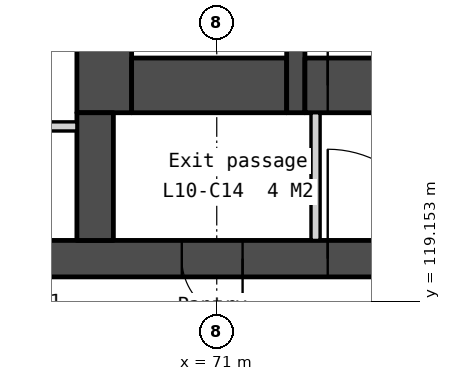
"""IFC4 building model, lengths in metres.
Left out: names, types, materials, properties, quantities, classifications, styles, units other than length and angle.
Written with IfcOpenShell. Run it as: python <this file> out.ifc"""

import sys

from ifc_helpers import new_model, si_unit, direction, frame, frame_2d, origin, place, context, subcontext, project, spatial, polyline, rectangle, outline, extrude, element, fill, save


model = new_model("IFC4")
c1 = context("Model", 3, precision=1e-05, world=origin(), true_north=direction((0.0, 1.0)))
c2 = subcontext(c1, "Body", "Model", "MODEL_VIEW")
j1 = project(units=[si_unit("LENGTHUNIT", "METRE"), si_unit("PLANEANGLEUNIT", "RADIAN")], contexts=[c1])
p1 = place(None, origin())
s1 = spatial("IfcSite", under=j1, at=p1, CompositionType="ELEMENT")
p2 = place(p1, origin())
s2 = spatial("IfcBuilding", under=s1, at=p2, CompositionType="ELEMENT")
p3 = place(p2, frame((0.0, 0.0, 49.0)))
s3 = spatial("IfcBuildingStorey", under=s2, at=p3, CompositionType="ELEMENT", Elevation=49.0)
p4 = place(p3, frame((66.0, 119.85, 0.0), z_axis=(0.0, 0.0, 1.0), x_axis=(1.0, 0.0, 0.0)))
e1 = element("IfcWall", 1, at=p4, inside=s3, PredefinedType="SOLIDWALL", context=c2, shape_type="SweptSolid", body=[
    extrude(rectangle(XDim=28.0, YDim=0.6, at=frame_2d((14.0, 0.0))), origin(), (0.0, 0.0, 1.0), 3.35),
])
p5 = place(p4, frame((6.825, 0.0, 0.0)))
e2 = element("IfcOpeningElement", 2, at=p5, cuts=e1, PredefinedType="OPENING", context=c2, shape_type="SweptSolid", body=[
    extrude(rectangle(XDim=1.8, YDim=2.1, at=frame_2d((0.9, 1.05))), frame((0.0, 0.31, 0.0), z_axis=(0.0, -1.0, 0.0), x_axis=(1.0, 0.0, 0.0)), (0.0, 0.0, 1.0), 0.62),
])
p6 = place(p4, frame((15.85, 0.0, 0.0)))
e3 = element("IfcOpeningElement", 3, at=p6, cuts=e1, PredefinedType="OPENING", context=c2, shape_type="SweptSolid", body=[
    extrude(rectangle(XDim=1.5, YDim=2.1, at=frame_2d((0.75, 1.05))), frame((0.0, 0.31, 0.0), z_axis=(0.0, -1.0, 0.0), x_axis=(1.0, 0.0, 0.0)), (0.0, 0.0, 1.0), 0.62),
])
p7 = place(p4, frame((19.375, 0.0, 0.0)))
e4 = element("IfcOpeningElement", 4, at=p7, cuts=e1, PredefinedType="OPENING", context=c2, shape_type="SweptSolid", body=[
    extrude(rectangle(XDim=1.8, YDim=2.1, at=frame_2d((0.9, 1.05))), frame((0.0, 0.31, 0.0), z_axis=(0.0, -1.0, 0.0), x_axis=(1.0, 0.0, 0.0)), (0.0, 0.0, 1.0), 0.62),
])
p8 = place(p4, frame((4.425, 0.0, 0.0)))
e5 = element("IfcOpeningElement", 5, at=p8, cuts=e1, PredefinedType="OPENING", context=c2, shape_type="SweptSolid", body=[
    extrude(rectangle(XDim=1.0, YDim=2.1, at=frame_2d((0.5, 1.05))), frame((0.0, 0.31, 0.0), z_axis=(0.0, -1.0, 0.0), x_axis=(1.0, 0.0, 0.0)), (0.0, 0.0, 1.0), 0.62),
])
p9 = place(p4, frame((9.783, 0.0, 0.0)))
e6 = element("IfcOpeningElement", 6, at=p9, cuts=e1, PredefinedType="OPENING", context=c2, shape_type="SweptSolid", body=[
    extrude(rectangle(XDim=1.0, YDim=2.1, at=frame_2d((0.5, 1.05))), frame((0.0, 0.31, 0.0), z_axis=(0.0, -1.0, 0.0), x_axis=(1.0, 0.0, 0.0)), (0.0, 0.0, 1.0), 0.62),
])
p10 = place(p4, frame((11.525, 0.0, 0.0)))
e7 = element("IfcOpeningElement", 7, at=p10, cuts=e1, PredefinedType="OPENING", context=c2, shape_type="SweptSolid", body=[
    extrude(rectangle(XDim=1.0, YDim=2.1, at=frame_2d((0.5, 1.05))), frame((0.0, 0.31, 0.0), z_axis=(0.0, -1.0, 0.0), x_axis=(1.0, 0.0, 0.0)), (0.0, 0.0, 1.0), 0.62),
])
p11 = place(p4, frame((13.658, 0.0, 0.0)))
e8 = element("IfcOpeningElement", 8, at=p11, cuts=e1, PredefinedType="OPENING", context=c2, shape_type="SweptSolid", body=[
    extrude(rectangle(XDim=1.0, YDim=2.1, at=frame_2d((0.5, 1.05))), frame((0.0, 0.31, 0.0), z_axis=(0.0, -1.0, 0.0), x_axis=(1.0, 0.0, 0.0)), (0.0, 0.0, 1.0), 0.62),
])
p12 = place(p4, frame((21.725, 0.0, 0.0)))
e9 = element("IfcOpeningElement", 9, at=p12, cuts=e1, PredefinedType="OPENING", context=c2, shape_type="SweptSolid", body=[
    extrude(rectangle(XDim=1.0, YDim=2.1, at=frame_2d((0.5, 1.05))), frame((0.0, 0.31, 0.0), z_axis=(0.0, -1.0, 0.0), x_axis=(1.0, 0.0, 0.0)), (0.0, 0.0, 1.0), 0.62),
])
p13 = place(p4, frame((23.425, 0.0, 0.0)))
e10 = element("IfcOpeningElement", 10, at=p13, cuts=e1, PredefinedType="OPENING", context=c2, shape_type="SweptSolid", body=[
    extrude(rectangle(XDim=1.0, YDim=2.1, at=frame_2d((0.5, 1.05))), frame((0.0, 0.31, 0.0), z_axis=(0.0, -1.0, 0.0), x_axis=(1.0, 0.0, 0.0)), (0.0, 0.0, 1.0), 0.62),
])
p14 = place(p3, frame((66.6, 122.025, 0.0), z_axis=(0.0, 0.0, 1.0), x_axis=(1.0, 0.0, 0.0)))
e11 = element("IfcWall", 11, at=p14, inside=s3, PredefinedType="PARTITIONING", context=c2, shape_type="SweptSolid", body=[
    extrude(rectangle(XDim=2.1, YDim=0.15, at=frame_2d((1.05, 0.0))), origin(), (0.0, 0.0, 1.0), 3.35),
])
p15 = place(p3, frame((69.15, 133.95, 0.0), z_axis=(0.0, 0.0, 1.0), x_axis=(0.0, -1.0, 0.0)))
e12 = element("IfcWall", 12, at=p15, inside=s3, PredefinedType="SOLIDWALL", context=c2, shape_type="SweptSolid", body=[
    extrude(rectangle(XDim=11.7, YDim=0.9, at=frame_2d((5.85, 0.0))), origin(), (0.0, 0.0, 1.0), 3.35),
])
p16 = place(p3, frame((69.0, 122.25, 0.0), z_axis=(0.0, 0.0, 1.0), x_axis=(0.0, -1.0, 0.0)))
e13 = element("IfcWall", 13, at=p16, inside=s3, PredefinedType="SOLIDWALL", context=c2, shape_type="SweptSolid", body=[
    extrude(rectangle(XDim=2.1, YDim=0.6, at=frame_2d((1.05, 0.0))), origin(), (0.0, 0.0, 1.0), 3.35),
])
p17 = place(p3, frame((69.6, 122.7, 0.0), z_axis=(0.0, 0.0, 1.0), x_axis=(1.0, 0.0, 0.0)))
e14 = element("IfcWall", 14, at=p17, inside=s3, PredefinedType="SOLIDWALL", context=c2, shape_type="SweptSolid", body=[
    extrude(rectangle(XDim=2.55, YDim=0.9, at=frame_2d((1.275, 0.0))), origin(), (0.0, 0.0, 1.0), 3.35),
])
p18 = place(p3, frame((72.3, 133.95, 0.0), z_axis=(0.0, 0.0, 1.0), x_axis=(0.0, -1.0, 0.0)))
e15 = element("IfcWall", 15, at=p18, inside=s3, PredefinedType="SOLIDWALL", context=c2, shape_type="SweptSolid", body=[
    extrude(rectangle(XDim=11.7, YDim=0.3, at=frame_2d((5.85, 0.0))), origin(), (0.0, 0.0, 1.0), 3.35),
])
p19 = place(p18, frame((6.95, 0.0, 0.0)))
e16 = element("IfcOpeningElement", 16, at=p19, cuts=e15, PredefinedType="OPENING", context=c2, shape_type="SweptSolid", body=[
    extrude(rectangle(XDim=1.1, YDim=2.1, at=frame_2d((0.55, 1.05))), frame((0.0, 0.16, 0.0), z_axis=(0.0, -1.0, 0.0), x_axis=(1.0, 0.0, 0.0)), (0.0, 0.0, 1.0), 0.32),
])
p20 = place(p18, frame((9.35, 0.0, 0.0)))
e17 = element("IfcOpeningElement", 17, at=p20, cuts=e15, PredefinedType="OPENING", context=c2, shape_type="SweptSolid", body=[
    extrude(rectangle(XDim=0.9, YDim=2.1, at=frame_2d((0.45, 1.05))), frame((0.0, 0.16, 0.0), z_axis=(0.0, -1.0, 0.0), x_axis=(1.0, 0.0, 0.0)), (0.0, 0.0, 1.0), 0.32),
])
p21 = place(p18, frame((5.1, 0.0, 0.0)))
e18 = element("IfcOpeningElement", 18, at=p21, cuts=e15, PredefinedType="OPENING", context=c2, shape_type="SweptSolid", body=[
    extrude(rectangle(XDim=1.0, YDim=2.1, at=frame_2d((0.5, 1.05))), frame((0.0, 0.16, 0.0), z_axis=(0.0, -1.0, 0.0), x_axis=(1.0, 0.0, 0.0)), (0.0, 0.0, 1.0), 0.32),
])
p22 = place(p3, frame((72.45, 122.7, 0.0), z_axis=(0.0, 0.0, 1.0), x_axis=(1.0, 0.0, 0.0)))
e19 = element("IfcWall", 19, at=p22, inside=s3, PredefinedType="SOLIDWALL", context=c2, shape_type="SweptSolid", body=[
    extrude(rectangle(XDim=2.55, YDim=0.9, at=frame_2d((1.275, 0.0))), origin(), (0.0, 0.0, 1.0), 3.35),
])
p23 = place(p22, frame((0.375, 0.0, 0.0)))
e20 = element("IfcOpeningElement", 20, at=p23, cuts=e19, PredefinedType="OPENING", context=c2, shape_type="SweptSolid", body=[
    extrude(rectangle(XDim=1.8, YDim=2.1, at=frame_2d((0.9, 1.05))), frame((0.0, 0.46, 0.0), z_axis=(0.0, -1.0, 0.0), x_axis=(1.0, 0.0, 0.0)), (0.0, 0.0, 1.0), 0.92),
])
p24 = place(p3, frame((72.625, 122.25, 0.0), z_axis=(0.0, 0.0, 1.0), x_axis=(0.0, -1.0, 0.0)))
e21 = element("IfcWall", 21, at=p24, inside=s3, PredefinedType="PARTITIONING", context=c2, shape_type="SweptSolid", body=[
    extrude(rectangle(XDim=2.1, YDim=0.15, at=frame_2d((1.05, 0.0))), origin(), (0.0, 0.0, 1.0), 3.35),
])
p25 = place(p3, frame((54.495, 129.397, -0.15), z_axis=(0.0, 0.0, 1.0), x_axis=(0.499999201451, -0.866025864826, 0.0)))
e22 = element("IfcWall", 22, at=p25, inside=s3, PredefinedType="SOLIDWALL", context=c2, shape_type="SweptSolid", body=[
    extrude(outline(polyline([(44.8, 0.0), (44.8, 3.5), (0.0, 3.5), (0.0, 0.0), (44.8, 0.0)])), frame((0.0, 0.225, 0.0), z_axis=(0.0, -1.0, 0.0), x_axis=(1.0, 0.0, 0.0)), (0.0, 0.0, 1.0), 0.45),
])
p26 = place(p25, frame((2.43, 0.0, 1.05)))
e23 = element("IfcOpeningElement", 23, at=p26, cuts=e22, PredefinedType="OPENING", context=c2, shape_type="SweptSolid", body=[
    extrude(rectangle(XDim=1.8, YDim=1.5, at=frame_2d((0.9, 0.75))), frame((0.0, 0.235, 0.0), z_axis=(0.0, -1.0, 0.0), x_axis=(1.0, 0.0, 0.0)), (0.0, 0.0, 1.0), 0.47),
])
p27 = place(p25, frame((4.73, 0.0, 1.05)))
e24 = element("IfcOpeningElement", 24, at=p27, cuts=e22, PredefinedType="OPENING", context=c2, shape_type="SweptSolid", body=[
    extrude(rectangle(XDim=1.8, YDim=1.5, at=frame_2d((0.9, 0.75))), frame((0.0, 0.235, 0.0), z_axis=(0.0, -1.0, 0.0), x_axis=(1.0, 0.0, 0.0)), (0.0, 0.0, 1.0), 0.47),
])
p28 = place(p25, frame((11.39, 0.0, 1.05)))
e25 = element("IfcOpeningElement", 25, at=p28, cuts=e22, PredefinedType="OPENING", context=c2, shape_type="SweptSolid", body=[
    extrude(rectangle(XDim=1.8, YDim=1.5, at=frame_2d((0.9, 0.75))), frame((0.0, 0.235, 0.0), z_axis=(0.0, -1.0, 0.0), x_axis=(1.0, 0.0, 0.0)), (0.0, 0.0, 1.0), 0.47),
])
p29 = place(p25, frame((13.69, 0.0, 1.05)))
e26 = element("IfcOpeningElement", 26, at=p29, cuts=e22, PredefinedType="OPENING", context=c2, shape_type="SweptSolid", body=[
    extrude(rectangle(XDim=1.8, YDim=1.5, at=frame_2d((0.9, 0.75))), frame((0.0, 0.235, 0.0), z_axis=(0.0, -1.0, 0.0), x_axis=(1.0, 0.0, 0.0)), (0.0, 0.0, 1.0), 0.47),
])
p30 = place(p25, frame((20.35, 0.0, 1.05)))
e27 = element("IfcOpeningElement", 27, at=p30, cuts=e22, PredefinedType="OPENING", context=c2, shape_type="SweptSolid", body=[
    extrude(rectangle(XDim=1.8, YDim=1.5, at=frame_2d((0.9, 0.75))), frame((0.0, 0.235, 0.0), z_axis=(0.0, -1.0, 0.0), x_axis=(1.0, 0.0, 0.0)), (0.0, 0.0, 1.0), 0.47),
])
p31 = place(p25, frame((22.65, 0.0, 1.05)))
e28 = element("IfcOpeningElement", 28, at=p31, cuts=e22, PredefinedType="OPENING", context=c2, shape_type="SweptSolid", body=[
    extrude(rectangle(XDim=1.8, YDim=1.5, at=frame_2d((0.9, 0.75))), frame((0.0, 0.235, 0.0), z_axis=(0.0, -1.0, 0.0), x_axis=(1.0, 0.0, 0.0)), (0.0, 0.0, 1.0), 0.47),
])
p32 = place(p25, frame((29.31, 0.0, 1.05)))
e29 = element("IfcOpeningElement", 29, at=p32, cuts=e22, PredefinedType="OPENING", context=c2, shape_type="SweptSolid", body=[
    extrude(rectangle(XDim=1.8, YDim=1.5, at=frame_2d((0.9, 0.75))), frame((0.0, 0.235, 0.0), z_axis=(0.0, -1.0, 0.0), x_axis=(1.0, 0.0, 0.0)), (0.0, 0.0, 1.0), 0.47),
])
p33 = place(p25, frame((31.61, 0.0, 1.05)))
e30 = element("IfcOpeningElement", 30, at=p33, cuts=e22, PredefinedType="OPENING", context=c2, shape_type="SweptSolid", body=[
    extrude(rectangle(XDim=1.8, YDim=1.5, at=frame_2d((0.9, 0.75))), frame((0.0, 0.235, 0.0), z_axis=(0.0, -1.0, 0.0), x_axis=(1.0, 0.0, 0.0)), (0.0, 0.0, 1.0), 0.47),
])
p34 = place(p25, frame((38.27, 0.0, 1.05)))
e31 = element("IfcOpeningElement", 31, at=p34, cuts=e22, PredefinedType="OPENING", context=c2, shape_type="SweptSolid", body=[
    extrude(rectangle(XDim=1.8, YDim=1.5, at=frame_2d((0.9, 0.75))), frame((0.0, 0.235, 0.0), z_axis=(0.0, -1.0, 0.0), x_axis=(1.0, 0.0, 0.0)), (0.0, 0.0, 1.0), 0.47),
])
p35 = place(p25, frame((40.57, 0.0, 1.05)))
e32 = element("IfcOpeningElement", 32, at=p35, cuts=e22, PredefinedType="OPENING", context=c2, shape_type="SweptSolid", body=[
    extrude(rectangle(XDim=1.8, YDim=1.5, at=frame_2d((0.9, 0.75))), frame((0.0, 0.235, 0.0), z_axis=(0.0, -1.0, 0.0), x_axis=(1.0, 0.0, 0.0)), (0.0, 0.0, 1.0), 0.47),
])
p36 = place(p23, origin())
e33 = element("IfcDoor", 33, at=p36, inside=s3, OperationType="DOUBLE_DOOR_DOUBLE_SWING", PredefinedType="DOOR", context=c2, shape_type="SweptSolid", body=[
    extrude(rectangle(XDim=1.8, YDim=2.1, at=frame_2d((0.9, 1.05))), frame((0.0, 0.025, 0.0), z_axis=(0.0, -1.0, 0.0), x_axis=(1.0, 0.0, 0.0)), (0.0, 0.0, 1.0), 0.05),
])
fill(e20, e33)
p37 = place(p5, origin())
e34 = element("IfcDoor", 34, at=p37, inside=s3, OperationType="DOUBLE_DOOR_DOUBLE_SWING", PredefinedType="DOOR", context=c2, shape_type="SweptSolid", body=[
    extrude(rectangle(XDim=1.8, YDim=2.1, at=frame_2d((0.9, 1.05))), frame((0.0, 0.025, 0.0), z_axis=(0.0, -1.0, 0.0), x_axis=(1.0, 0.0, 0.0)), (0.0, 0.0, 1.0), 0.05),
])
fill(e2, e34)
p38 = place(p8, origin())
e35 = element("IfcDoor", 35, at=p38, inside=s3, OperationType="SINGLE_SWING_RIGHT", PredefinedType="DOOR", context=c2, shape_type="SweptSolid", body=[
    extrude(rectangle(XDim=1.0, YDim=2.1, at=frame_2d((0.5, 1.05))), frame((0.0, 0.025, 0.0), z_axis=(0.0, -1.0, 0.0), x_axis=(1.0, 0.0, 0.0)), (0.0, 0.0, 1.0), 0.05),
])
fill(e5, e35)
save(model, sys.argv[1])
